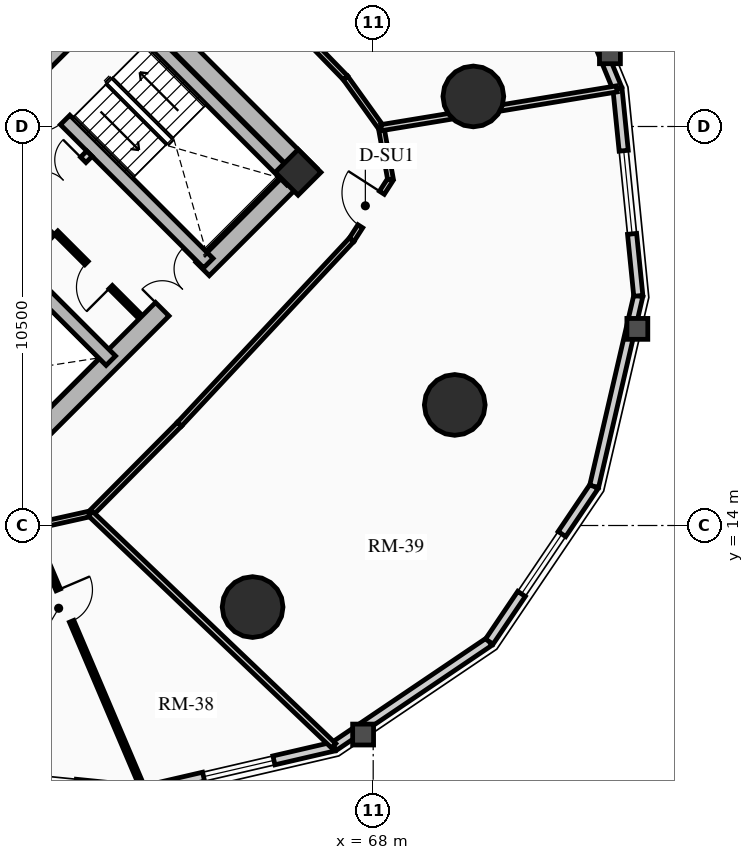
"""IFC4 building model, lengths in metres.
Left out: names, types, materials, properties, quantities, classifications, styles, units other than length and angle.
Written with IfcOpenShell. Run it as: python <this file> out.ifc"""

import sys

from ifc_helpers import new_model, si_unit, direction, frame, frame_2d, origin, origin_2d, place, context, subcontext, project, spatial, rectangle, circle, extrude, source, transform, mapped, element, fill, save


model = new_model("IFC4")
c1 = context("Model", 3, precision=1e-05, world=origin(), true_north=direction((0.0, 1.0)))
c2 = subcontext(c1, "Body", "Model", "MODEL_VIEW")
j1 = project(units=[si_unit("LENGTHUNIT", "METRE"), si_unit("PLANEANGLEUNIT", "RADIAN")], contexts=[c1])
p1 = place(None, origin())
s1 = spatial("IfcSite", under=j1, at=p1, CompositionType="ELEMENT")
p2 = place(p1, origin())
s2 = spatial("IfcBuilding", under=s1, at=p2, CompositionType="ELEMENT")
p3 = place(p2, frame((0.0, 0.0, 62.74)))
s3 = spatial("IfcBuildingStorey", under=s2, at=p3, CompositionType="ELEMENT", Elevation=62.74)
p4 = place(p3, frame((66.339, 23.227, 0.0), z_axis=(0.0, 0.0, 1.0), x_axis=(-0.707106781187, 0.707106781187, 0.0)))
e1 = element("IfcWall", 1, at=p4, inside=s3, PredefinedType="SHEAR", context=c2, shape_type="SweptSolid", body=[
    extrude(rectangle(XDim=14.3, YDim=0.5, at=frame_2d((7.15, 0.0))), origin(), (0.0, 0.0, 1.0), 2.91),
])
p5 = place(p3, frame((58.596, 15.838, 0.0), z_axis=(0.0, 0.0, 1.0), x_axis=(0.707106781187, 0.707106781187, 0.0)))
e2 = element("IfcWall", 2, at=p5, inside=s3, PredefinedType="SHEAR", context=c2, shape_type="SweptSolid", body=[
    extrude(rectangle(XDim=10.7, YDim=0.5, at=frame_2d((5.35, 0.0))), origin(), (0.0, 0.0, 1.0), 2.91),
])
m1 = source(origin(), c2, "Body", "SweptSolid", [
    extrude(rectangle(XDim=1.5, YDim=2.02, at=frame_2d((0.75, 1.01))), frame((0.0, 0.26, 0.0), z_axis=(0.0, -1.0, 0.0), x_axis=(1.0, 0.0, 0.0)), (0.0, 0.0, 1.0), 0.52),
])
p6 = place(p5, frame((5.45, 0.0, 0.0)))
e3 = element("IfcOpeningElement", 3, at=p6, cuts=e2, PredefinedType="OPENING", context=c2, shape_type="MappedRepresentation", body=[
    mapped(m1, transform((0.0, 0.0, 0.0), x_axis=(1.0, 0.0, 0.0), y_axis=(0.0, 1.0, 0.0), z_axis=(0.0, 0.0, 1.0), scale=1.0)),
])
p7 = place(p3, frame((61.096, 18.338, 0.0), z_axis=(0.0, 0.0, 1.0), x_axis=(-0.707106781187, 0.707106781187, 0.0)))
e4 = element("IfcWall", 4, at=p7, inside=s3, PredefinedType="SHEAR", context=c2, shape_type="SweptSolid", body=[
    extrude(rectangle(XDim=13.8, YDim=0.35, at=frame_2d((6.9, 0.0))), origin(), (0.0, 0.0, 1.0), 2.91),
])
m2 = source(origin(), c2, "Body", "SweptSolid", [
    extrude(rectangle(XDim=1.1, YDim=2.015, at=frame_2d((0.55, 1.007))), frame((0.0, 0.185, 0.0), z_axis=(0.0, -1.0, 0.0), x_axis=(1.0, 0.0, 0.0)), (0.0, 0.0, 1.0), 0.37),
])
p8 = place(p7, frame((4.9, 0.0, 0.0)))
e5 = element("IfcOpeningElement", 5, at=p8, cuts=e4, PredefinedType="OPENING", context=c2, shape_type="MappedRepresentation", body=[
    mapped(m2, transform((0.0, 0.0, 0.0), x_axis=(1.0, 0.0, 0.0), y_axis=(0.0, 1.0, 0.0), z_axis=(0.0, 0.0, 1.0), scale=1.0)),
])
m3 = source(origin(), c2, "Body", "SweptSolid", [
    extrude(rectangle(XDim=1.15, YDim=2.02, at=frame_2d((0.575, 1.01))), frame((0.0, 0.185, 0.0), z_axis=(0.0, -1.0, 0.0), x_axis=(1.0, 0.0, 0.0)), (0.0, 0.0, 1.0), 0.37),
])
p9 = place(p7, frame((7.32, 0.0, 0.0)))
e6 = element("IfcOpeningElement", 6, at=p9, cuts=e4, PredefinedType="OPENING", context=c2, shape_type="MappedRepresentation", body=[
    mapped(m3, transform((0.0, 0.0, 0.0), x_axis=(1.0, 0.0, 0.0), y_axis=(0.0, 1.0, 0.0), z_axis=(0.0, 0.0, 1.0), scale=1.0)),
])
p10 = place(p3, frame((63.662, 20.904, 0.0), z_axis=(0.0, 0.0, 1.0), x_axis=(-0.707106781187, 0.707106781187, 0.0)))
e7 = element("IfcWall", 7, at=p10, inside=s3, PredefinedType="SHEAR", context=c2, shape_type="SweptSolid", body=[
    extrude(rectangle(XDim=13.8, YDim=0.35, at=frame_2d((6.9, 0.0))), origin(), (0.0, 0.0, 1.0), 2.91),
])
p11 = place(p10, frame((10.025, 0.0, 0.0)))
e8 = element("IfcOpeningElement", 8, at=p11, cuts=e7, PredefinedType="OPENING", context=c2, shape_type="MappedRepresentation", body=[
    mapped(m2, transform((0.0, 0.0, 0.0), x_axis=(1.0, 0.0, 0.0), y_axis=(0.0, 1.0, 0.0), z_axis=(0.0, 0.0, 1.0), scale=1.0)),
])
p12 = place(p10, frame((12.025, 0.0, 0.0)))
e9 = element("IfcOpeningElement", 9, at=p12, cuts=e7, PredefinedType="OPENING", context=c2, shape_type="MappedRepresentation", body=[
    mapped(m2, transform((0.0, 0.0, 0.0), x_axis=(1.0, 0.0, 0.0), y_axis=(0.0, 1.0, 0.0), z_axis=(0.0, 0.0, 1.0), scale=1.0)),
])
p13 = place(p10, frame((5.33, 0.0, 0.0)))
e10 = element("IfcOpeningElement", 10, at=p13, cuts=e7, PredefinedType="OPENING", context=c2, shape_type="MappedRepresentation", body=[
    mapped(m3, transform((0.0, 0.0, 0.0), x_axis=(1.0, 0.0, 0.0), y_axis=(0.0, 1.0, 0.0), z_axis=(0.0, 0.0, 1.0), scale=1.0)),
])
p14 = place(p3, frame((65.847, 23.089, 0.0), z_axis=(0.0, 0.0, 1.0), x_axis=(-0.707106781187, 0.707106781187, 0.0)))
e11 = element("IfcWall", 11, at=p14, inside=s3, PredefinedType="SHEAR", context=c2, shape_type="SweptSolid", body=[
    extrude(rectangle(XDim=6.745, YDim=0.35, at=frame_2d((3.373, 0.0))), origin(), (0.0, 0.0, 1.0), 2.91),
])
p15 = place(p3, frame((58.893, 25.674, 0.0), z_axis=(0.0, 0.0, 1.0), x_axis=(0.707106781187, 0.707106781187, 0.0)))
e12 = element("IfcWall", 12, at=p15, inside=s3, PredefinedType="SHEAR", context=c2, shape_type="SweptSolid", body=[
    extrude(rectangle(XDim=3.285, YDim=0.35, at=frame_2d((1.643, 0.0))), origin(), (0.0, 0.0, 1.0), 2.91),
])
p16 = place(p3, frame((66.024, 23.294, 0.0), z_axis=(0.0, 0.0, 1.0), x_axis=(0.707106781187, 0.707106781187, 0.0)))
e13 = element("IfcColumn", 13, at=p16, inside=s3, PredefinedType="COLUMN", context=c2, shape_type="SweptSolid", body=[
    extrude(rectangle(XDim=0.85, YDim=0.85, at=origin_2d()), origin(), (0.0, 0.0, 1.0), 2.91),
])
for number, where, z_axis, x_axis in (
    (14, (64.827, 11.854, 0.0), (0.0, 0.0, 1.0), (1.0, 0.0, 0.0)),
    (15, (70.146, 17.173, 0.0), (0.0, 0.0, 1.0), (1.0, 0.0, 0.0)),
    (16, (70.635, 25.291, 0.0), (0.0, 0.0, 1.0), (1.0, 0.0, 0.0)),
):
    element("IfcColumn", number, at=place(p3, frame(where, z_axis=z_axis, x_axis=x_axis)), inside=s3, PredefinedType="USERDEFINED", context=c2, shape_type="SweptSolid", body=[
        extrude(circle(Radius=0.8, at=origin_2d()), origin(), (0.0, 0.0, 1.0), 2.91),
    ])
p17 = place(p3, frame((61.957, 7.024, 0.0), z_axis=(0.0, 0.0, 1.0), x_axis=(-0.994970765694, 0.100165739718, 0.0)))
e17 = element("IfcWall", 17, at=p17, inside=s3, PredefinedType="SOLIDWALL", context=c2, shape_type="SweptSolid", body=[
    extrude(rectangle(XDim=5.477, YDim=0.24, at=frame_2d((2.738, 0.0))), origin(), (0.0, 0.0, 1.0), 2.079),
])
m4 = source(origin(), c2, "Body", "SweptSolid", [
    extrude(rectangle(XDim=1.9, YDim=1.35, at=frame_2d((0.95, 0.675))), frame((0.0, 0.13, 0.0), z_axis=(0.0, -1.0, 0.0), x_axis=(1.0, 0.0, 0.0)), (0.0, 0.0, 1.0), 0.26),
])
p18 = place(p17, frame((1.788, 0.0, 0.65)))
e18 = element("IfcOpeningElement", 18, at=p18, cuts=e17, PredefinedType="OPENING", context=c2, shape_type="MappedRepresentation", body=[
    mapped(m4, transform((0.0, 0.0, 0.0), x_axis=(1.0, 0.0, 0.0), y_axis=(0.0, 1.0, 0.0), z_axis=(0.0, 0.0, 1.0), scale=1.0)),
])
p19 = place(p3, frame((66.969, 8.186, 0.0), z_axis=(0.0, 0.0, 1.0), x_axis=(-0.974166016949, -0.225833060959, 0.0)))
e19 = element("IfcWall", 19, at=p19, inside=s3, PredefinedType="SOLIDWALL", context=c2, shape_type="SweptSolid", body=[
    extrude(rectangle(XDim=5.146, YDim=0.24, at=frame_2d((2.573, 0.0))), origin(), (0.0, 0.0, 1.0), 2.079),
])
p20 = place(p19, frame((1.623, 0.0, 0.65)))
e20 = element("IfcOpeningElement", 20, at=p20, cuts=e19, PredefinedType="OPENING", context=c2, shape_type="MappedRepresentation", body=[
    mapped(m4, transform((0.0, 0.0, 0.0), x_axis=(1.0, 0.0, 0.0), y_axis=(0.0, 1.0, 0.0), z_axis=(0.0, 0.0, 1.0), scale=1.0)),
])
p21 = place(p3, frame((71.055, 10.945, 0.0), z_axis=(0.0, 0.0, 1.0), x_axis=(-0.828736708604, -0.559638693991, 0.0)))
e21 = element("IfcWall", 21, at=p21, inside=s3, PredefinedType="SOLIDWALL", context=c2, shape_type="SweptSolid", body=[
    extrude(rectangle(XDim=4.93, YDim=0.24, at=frame_2d((2.465, 0.0))), origin(), (0.0, 0.0, 1.0), 2.079),
])
p22 = place(p3, frame((73.814, 15.031, 0.0), z_axis=(0.0, 0.0, 1.0), x_axis=(-0.559638693991, -0.828736708604, 0.0)))
e22 = element("IfcWall", 22, at=p22, inside=s3, PredefinedType="SOLIDWALL", context=c2, shape_type="SweptSolid", body=[
    extrude(rectangle(XDim=4.93, YDim=0.24, at=frame_2d((2.465, 0.0))), origin(), (0.0, 0.0, 1.0), 2.079),
])
p23 = place(p22, frame((1.515, 0.0, 0.65)))
e23 = element("IfcOpeningElement", 23, at=p23, cuts=e22, PredefinedType="OPENING", context=c2, shape_type="MappedRepresentation", body=[
    mapped(m4, transform((0.0, 0.0, 0.0), x_axis=(1.0, 0.0, 0.0), y_axis=(0.0, 1.0, 0.0), z_axis=(0.0, 0.0, 1.0), scale=1.0)),
])
p24 = place(p3, frame((74.976, 20.043, 0.0), z_axis=(0.0, 0.0, 1.0), x_axis=(-0.225833060959, -0.974166016949, 0.0)))
e24 = element("IfcWall", 24, at=p24, inside=s3, PredefinedType="SOLIDWALL", context=c2, shape_type="SweptSolid", body=[
    extrude(rectangle(XDim=5.146, YDim=0.24, at=frame_2d((2.573, 0.0))), origin(), (0.0, 0.0, 1.0), 2.079),
])
p25 = place(p3, frame((74.428, 25.493, 0.0), z_axis=(0.0, 0.0, 1.0), x_axis=(0.100165739718, -0.994970765694, 0.0)))
e25 = element("IfcWall", 25, at=p25, inside=s3, PredefinedType="SOLIDWALL", context=c2, shape_type="SweptSolid", body=[
    extrude(rectangle(XDim=5.477, YDim=0.24, at=frame_2d((2.738, 0.0))), origin(), (0.0, 0.0, 1.0), 2.079),
])
m5 = source(origin(), c2, "Body", "SweptSolid", [
    extrude(rectangle(XDim=2.2, YDim=1.35, at=frame_2d((1.1, 0.675))), frame((0.0, 0.13, 0.0), z_axis=(0.0, -1.0, 0.0), x_axis=(1.0, 0.0, 0.0)), (0.0, 0.0, 1.0), 0.26),
])
p26 = place(p25, frame((1.638, 0.0, 0.65)))
e26 = element("IfcOpeningElement", 26, at=p26, cuts=e25, PredefinedType="OPENING", context=c2, shape_type="MappedRepresentation", body=[
    mapped(m5, transform((0.0, 0.0, 0.0), x_axis=(1.0, 0.0, 0.0), y_axis=(0.0, 1.0, 0.0), z_axis=(0.0, 0.0, 1.0), scale=1.0)),
])
p27 = place(p3, frame((72.222, 30.844, 0.0), z_axis=(0.0, 0.0, 1.0), x_axis=(0.381027682565, -0.924563629567, 0.0)))
e27 = element("IfcWall", 27, at=p27, inside=s3, PredefinedType="SOLIDWALL", context=c2, shape_type="SweptSolid", body=[
    extrude(rectangle(XDim=5.789, YDim=0.24, at=frame_2d((2.894, 0.0))), origin(), (0.0, 0.0, 1.0), 2.079),
])
p28 = place(p3, frame((58.214, 21.467, 0.0), z_axis=(0.0, 0.0, 1.0), x_axis=(0.707106781187, 0.707106781187, 0.0)))
e28 = element("IfcWall", 28, at=p28, inside=s3, PredefinedType="PARTITIONING", context=c2, shape_type="SweptSolid", body=[
    extrude(rectangle(XDim=3.28, YDim=0.2, at=frame_2d((1.64, 0.0))), origin(), (0.0, 0.0, 1.0), 2.555),
])
m6 = source(origin(), c2, "Body", "SweptSolid", [
    extrude(rectangle(XDim=1.5, YDim=2.02, at=frame_2d((0.75, 1.01))), frame((0.0, 0.11, 0.0), z_axis=(0.0, -1.0, 0.0), x_axis=(1.0, 0.0, 0.0)), (0.0, 0.0, 1.0), 0.22),
])
p29 = place(p28, frame((1.55, 0.0, 0.0)))
e29 = element("IfcOpeningElement", 29, at=p29, cuts=e28, PredefinedType="OPENING", context=c2, shape_type="MappedRepresentation", body=[
    mapped(m6, transform((0.0, 0.0, 0.0), x_axis=(1.0, 0.0, 0.0), y_axis=(0.0, 1.0, 0.0), z_axis=(0.0, 0.0, 1.0), scale=1.0)),
])
p30 = place(p3, frame((61.835, 19.529, 0.0), z_axis=(0.0, 0.0, 1.0), x_axis=(-0.707146413884, 0.707067146267, 0.0)))
e30 = element("IfcWall", 30, at=p30, inside=s3, PredefinedType="PARTITIONING", context=c2, shape_type="SweptSolid", body=[
    extrude(rectangle(XDim=3.08, YDim=0.125, at=frame_2d((1.54, 0.0))), origin(), (0.0, 0.0, 1.0), 2.555),
])
m7 = source(origin(), c2, "Body", "SweptSolid", [
    extrude(rectangle(XDim=0.9, YDim=2.005, at=frame_2d((0.45, 1.002))), frame((0.0, 0.073, 0.0), z_axis=(0.0, -1.0, 0.0), x_axis=(1.0, 0.0, 0.0)), (0.0, 0.0, 1.0), 0.145),
])
p31 = place(p30, frame((1.05, 0.0, 0.0)))
e31 = element("IfcOpeningElement", 31, at=p31, cuts=e30, PredefinedType="OPENING", context=c2, shape_type="MappedRepresentation", body=[
    mapped(m7, transform((0.0, 0.0, 0.0), x_axis=(1.0, 0.0, 0.0), y_axis=(0.0, 1.0, 0.0), z_axis=(0.0, 0.0, 1.0), scale=1.0)),
])
p32 = place(p3, frame((58.794, 20.915, 0.0), z_axis=(0.0, 0.0, 1.0), x_axis=(0.707106781187, 0.707106781187, 0.0)))
e32 = element("IfcWall", 32, at=p32, inside=s3, PredefinedType="PARTITIONING", context=c2, shape_type="SweptSolid", body=[
    extrude(rectangle(XDim=1.1, YDim=0.125, at=frame_2d((0.55, 0.0))), origin(), (0.0, 0.0, 1.0), 2.555),
])
p33 = place(p3, frame((59.008, 13.963, 0.0), z_axis=(0.0, 0.0, 1.0), x_axis=(0.976020856791, 0.21767702476, 0.0)))
e33 = element("IfcWall", 33, at=p33, inside=s3, PredefinedType="PARTITIONING", context=c2, shape_type="SweptSolid", body=[
    extrude(rectangle(XDim=1.593, YDim=0.15, at=frame_2d((0.796, 0.0))), origin(), (0.0, 0.0, 1.0), 2.125),
])
p34 = place(p3, frame((60.562, 14.31, 0.0), z_axis=(0.0, 0.0, 1.0), x_axis=(0.704566236161, 0.709638230975, 0.0)))
e34 = element("IfcWall", 34, at=p34, inside=s3, PredefinedType="PARTITIONING", context=c2, shape_type="SweptSolid", body=[
    extrude(rectangle(XDim=3.321, YDim=0.15, at=frame_2d((1.661, 0.0))), origin(), (0.0, 0.0, 1.0), 2.079),
])
p35 = place(p3, frame((62.903, 16.667, 0.0), z_axis=(0.0, 0.0, 1.0), x_axis=(0.682371947497, 0.731005147225, 0.0)))
e35 = element("IfcWall", 35, at=p35, inside=s3, PredefinedType="PARTITIONING", context=c2, shape_type="SweptSolid", body=[
    extrude(rectangle(XDim=6.642, YDim=0.15, at=frame_2d((3.321, 0.0))), origin(), (0.0, 0.0, 1.0), 2.079),
])
p36 = place(p3, frame((67.435, 21.521, 0.0), z_axis=(0.0, 0.0, 1.0), x_axis=(0.540777197838, 0.841165870859, 0.0)))
e36 = element("IfcWall", 36, at=p36, inside=s3, PredefinedType="PARTITIONING", context=c2, shape_type="SweptSolid", body=[
    extrude(rectangle(XDim=1.888, YDim=0.15, at=frame_2d((0.944, 0.0))), origin(), (0.0, 0.0, 1.0), 2.125),
])
m8 = source(origin(), c2, "Body", "SweptSolid", [
    extrude(rectangle(XDim=1.05, YDim=2.015, at=frame_2d((0.525, 1.007))), frame((0.0, 0.085, 0.0), z_axis=(0.0, -1.0, 0.0), x_axis=(1.0, 0.0, 0.0)), (0.0, 0.0, 1.0), 0.17),
])
p37 = place(p36, frame((0.419, 0.0, 0.0)))
e37 = element("IfcOpeningElement", 37, at=p37, cuts=e36, PredefinedType="OPENING", context=c2, shape_type="MappedRepresentation", body=[
    mapped(m8, transform((0.0, 0.0, 0.0), x_axis=(1.0, 0.0, 0.0), y_axis=(0.0, 1.0, 0.0), z_axis=(0.0, 0.0, 1.0), scale=1.0)),
])
p38 = place(p3, frame((68.456, 23.11, 0.0), z_axis=(0.0, 0.0, 1.0), x_axis=(-0.1772522795, 0.984165448191, 0.0)))
e38 = element("IfcWall", 38, at=p38, inside=s3, PredefinedType="PARTITIONING", context=c2, shape_type="SweptSolid", body=[
    extrude(rectangle(XDim=1.382, YDim=0.15, at=frame_2d((0.691, 0.0))), origin(), (0.0, 0.0, 1.0), 2.079),
])
p39 = place(p3, frame((68.211, 24.469, 0.0), z_axis=(0.0, 0.0, 1.0), x_axis=(-0.583012141368, 0.812463441034, 0.0)))
e39 = element("IfcWall", 39, at=p39, inside=s3, PredefinedType="PARTITIONING", context=c2, shape_type="SweptSolid", body=[
    extrude(rectangle(XDim=1.613, YDim=0.15, at=frame_2d((0.807, 0.0))), origin(), (0.0, 0.0, 1.0), 2.125),
])
p40 = place(p3, frame((67.27, 25.78, 0.0), z_axis=(0.0, 0.0, 1.0), x_axis=(-0.696847842907, 0.717218992942, 0.0)))
e40 = element("IfcWall", 40, at=p40, inside=s3, PredefinedType="PARTITIONING", context=c2, shape_type="SweptSolid", body=[
    extrude(rectangle(XDim=6.004, YDim=0.15, at=frame_2d((3.002, 0.0))), origin(), (0.0, 0.0, 1.0), 2.555),
])
m9 = source(origin(), c2, "Body", "SweptSolid", [
    extrude(rectangle(XDim=1.0, YDim=2.015, at=frame_2d((0.5, 1.007))), frame((0.0, 0.085, 0.0), z_axis=(0.0, -1.0, 0.0), x_axis=(1.0, 0.0, 0.0)), (0.0, 0.0, 1.0), 0.17),
])
p41 = place(p40, frame((2.502, 0.0, 0.0)))
e41 = element("IfcOpeningElement", 41, at=p41, cuts=e40, PredefinedType="OPENING", context=c2, shape_type="MappedRepresentation", body=[
    mapped(m9, transform((0.0, 0.0, 0.0), x_axis=(1.0, 0.0, 0.0), y_axis=(0.0, 1.0, 0.0), z_axis=(0.0, 0.0, 1.0), scale=1.0)),
])
p42 = place(p3, frame((60.562, 14.31, 0.0), z_axis=(0.0, 0.0, 1.0), x_axis=(0.723408813637, -0.690419936236, 0.0)))
e42 = element("IfcWall", 42, at=p42, inside=s3, PredefinedType="PARTITIONING", context=c2, shape_type="SweptSolid", body=[
    extrude(rectangle(XDim=8.844, YDim=0.16, at=frame_2d((4.422, 0.0))), origin(), (0.0, 0.0, 1.0), 2.079),
])
p43 = place(p3, frame((68.211, 24.469, 0.0), z_axis=(0.0, 0.0, 1.0), x_axis=(0.986718695255, 0.162438346562, 0.0)))
e43 = element("IfcWall", 43, at=p43, inside=s3, PredefinedType="PARTITIONING", context=c2, shape_type="SweptSolid", body=[
    extrude(rectangle(XDim=6.281, YDim=0.16, at=frame_2d((3.141, 0.0))), origin(), (0.0, 0.0, 1.0), 2.079),
])
p44 = place(p3, frame((59.008, 13.963, 0.0), z_axis=(0.0, 0.0, 1.0), x_axis=(0.391653414374, -0.920112820805, 0.0)))
e44 = element("IfcWall", 44, at=p44, inside=s3, PredefinedType="PARTITIONING", context=c2, shape_type="SweptSolid", body=[
    extrude(rectangle(XDim=7.52, YDim=0.125, at=frame_2d((3.76, 0.0))), origin(), (0.0, 0.0, 1.0), 2.079),
])
p45 = place(p44, frame((1.8, 0.0, 0.0)))
e45 = element("IfcOpeningElement", 45, at=p45, cuts=e44, PredefinedType="OPENING", context=c2, shape_type="MappedRepresentation", body=[
    mapped(m7, transform((0.0, 0.0, 0.0), x_axis=(1.0, 0.0, 0.0), y_axis=(0.0, 1.0, 0.0), z_axis=(0.0, 0.0, 1.0), scale=1.0)),
])
m10 = source(origin(), c2, "Body", "SweptSolid", [
    extrude(rectangle(XDim=1.9, YDim=1.35, at=frame_2d((0.95, 0.675))), frame((0.0, 0.03, 0.0), z_axis=(0.0, -1.0, 0.0), x_axis=(1.0, 0.0, 0.0)), (0.0, 0.0, 1.0), 0.06),
])
p46 = place(p18, origin())
e46 = element("IfcWindow", 46, at=p46, inside=s3, PartitioningType="DOUBLE_PANEL_VERTICAL", PredefinedType="WINDOW", context=c2, shape_type="MappedRepresentation", body=[
    mapped(m10, transform((0.0, 0.0, 0.0), x_axis=(1.0, 0.0, 0.0), y_axis=(0.0, 1.0, 0.0), z_axis=(0.0, 0.0, 1.0), scale=1.0)),
])
fill(e18, e46)
p47 = place(p20, origin())
e47 = element("IfcWindow", 47, at=p47, inside=s3, PartitioningType="DOUBLE_PANEL_VERTICAL", PredefinedType="WINDOW", context=c2, shape_type="MappedRepresentation", body=[
    mapped(m10, transform((0.0, 0.0, 0.0), x_axis=(1.0, 0.0, 0.0), y_axis=(0.0, 1.0, 0.0), z_axis=(0.0, 0.0, 1.0), scale=1.0)),
])
fill(e20, e47)
p48 = place(p23, origin())
e48 = element("IfcWindow", 48, at=p48, inside=s3, PartitioningType="DOUBLE_PANEL_VERTICAL", PredefinedType="WINDOW", context=c2, shape_type="MappedRepresentation", body=[
    mapped(m10, transform((0.0, 0.0, 0.0), x_axis=(1.0, 0.0, 0.0), y_axis=(0.0, 1.0, 0.0), z_axis=(0.0, 0.0, 1.0), scale=1.0)),
])
fill(e23, e48)
m11 = source(origin(), c2, "Body", "SweptSolid", [
    extrude(rectangle(XDim=2.2, YDim=1.35, at=frame_2d((1.1, 0.675))), frame((0.0, 0.03, 0.0), z_axis=(0.0, -1.0, 0.0), x_axis=(1.0, 0.0, 0.0)), (0.0, 0.0, 1.0), 0.06),
])
p49 = place(p26, origin())
e49 = element("IfcWindow", 49, at=p49, inside=s3, PartitioningType="DOUBLE_PANEL_VERTICAL", PredefinedType="WINDOW", context=c2, shape_type="MappedRepresentation", body=[
    mapped(m11, transform((0.0, 0.0, 0.0), x_axis=(1.0, 0.0, 0.0), y_axis=(0.0, 1.0, 0.0), z_axis=(0.0, 0.0, 1.0), scale=1.0)),
])
fill(e26, e49)
m12 = source(origin(), c2, "Body", "SweptSolid", [
    extrude(rectangle(XDim=1.15, YDim=2.02, at=frame_2d((0.575, 1.01))), frame((0.0, 0.025, 0.0), z_axis=(0.0, -1.0, 0.0), x_axis=(1.0, 0.0, 0.0)), (0.0, 0.0, 1.0), 0.05),
])
p50 = place(p13, origin())
e50 = element("IfcDoor", 50, at=p50, inside=s3, OperationType="SINGLE_SWING_RIGHT", PredefinedType="DOOR", context=c2, shape_type="MappedRepresentation", body=[
    mapped(m12, transform((0.0, 0.0, 0.0), x_axis=(1.0, 0.0, 0.0), y_axis=(0.0, 1.0, 0.0), z_axis=(0.0, 0.0, 1.0), scale=1.0)),
])
fill(e10, e50)
m13 = source(origin(), c2, "Body", "SweptSolid", [
    extrude(rectangle(XDim=1.5, YDim=2.02, at=frame_2d((0.75, 1.01))), frame((0.0, 0.025, 0.0), z_axis=(0.0, -1.0, 0.0), x_axis=(1.0, 0.0, 0.0)), (0.0, 0.0, 1.0), 0.05),
])
p51 = place(p6, origin())
e51 = element("IfcDoor", 51, at=p51, inside=s3, OperationType="DOUBLE_DOOR_SINGLE_SWING", PredefinedType="DOOR", context=c2, shape_type="MappedRepresentation", body=[
    mapped(m13, transform((0.0, 0.0, 0.0), x_axis=(1.0, 0.0, 0.0), y_axis=(0.0, 1.0, 0.0), z_axis=(0.0, 0.0, 1.0), scale=1.0)),
])
fill(e3, e51)
p52 = place(p29, origin())
e52 = element("IfcDoor", 52, at=p52, inside=s3, OperationType="DOUBLE_DOOR_SINGLE_SWING", PredefinedType="DOOR", context=c2, shape_type="MappedRepresentation", body=[
    mapped(m13, transform((0.0, 0.0, 0.0), x_axis=(1.0, 0.0, 0.0), y_axis=(0.0, 1.0, 0.0), z_axis=(0.0, 0.0, 1.0), scale=1.0)),
])
fill(e29, e52)
m14 = source(origin(), c2, "Body", "SweptSolid", [
    extrude(rectangle(XDim=0.9, YDim=2.005, at=frame_2d((0.45, 1.002))), frame((0.0, 0.025, 0.0), z_axis=(0.0, -1.0, 0.0), x_axis=(1.0, 0.0, 0.0)), (0.0, 0.0, 1.0), 0.05),
])
p53 = place(p31, origin())
e53 = element("IfcDoor", 53, at=p53, inside=s3, OperationType="SINGLE_SWING_LEFT", PredefinedType="DOOR", context=c2, shape_type="MappedRepresentation", body=[
    mapped(m14, transform((0.0, 0.0, 0.0), x_axis=(1.0, 0.0, 0.0), y_axis=(0.0, 1.0, 0.0), z_axis=(0.0, 0.0, 1.0), scale=1.0)),
])
fill(e31, e53)
p54 = place(p45, origin())
e54 = element("IfcDoor", 54, at=p54, inside=s3, OperationType="SINGLE_SWING_LEFT", PredefinedType="DOOR", context=c2, shape_type="MappedRepresentation", body=[
    mapped(m14, transform((0.0, 0.0, 0.0), x_axis=(1.0, 0.0, 0.0), y_axis=(0.0, 1.0, 0.0), z_axis=(0.0, 0.0, 1.0), scale=1.0)),
])
fill(e45, e54)
m15 = source(origin(), c2, "Body", "SweptSolid", [
    extrude(rectangle(XDim=1.05, YDim=2.015, at=frame_2d((0.525, 1.007))), frame((0.0, 0.025, 0.0), z_axis=(0.0, -1.0, 0.0), x_axis=(1.0, 0.0, 0.0)), (0.0, 0.0, 1.0), 0.05),
])
p55 = place(p37, origin())
e55 = element("IfcDoor", 55, at=p55, inside=s3, OperationType="SINGLE_SWING_RIGHT", PredefinedType="DOOR", context=c2, shape_type="MappedRepresentation", body=[
    mapped(m15, transform((0.0, 0.0, 0.0), x_axis=(1.0, 0.0, 0.0), y_axis=(0.0, 1.0, 0.0), z_axis=(0.0, 0.0, 1.0), scale=1.0)),
])
fill(e37, e55)
save(model, sys.argv[1])
